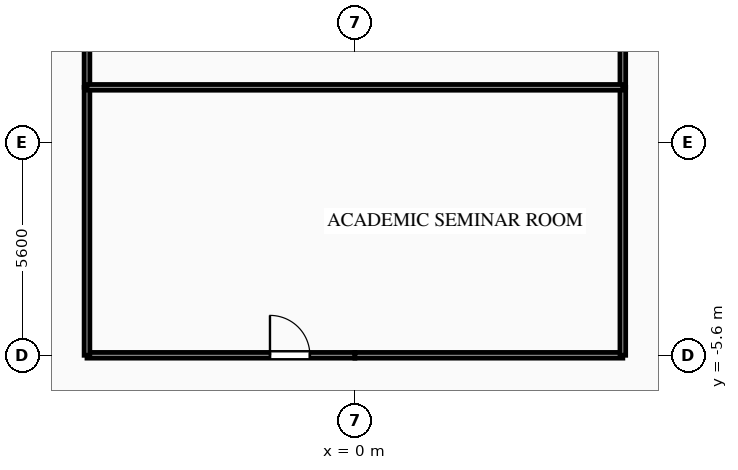
"""IFC4 building model, lengths in metres.
Left out: names, types, materials, properties, quantities, classifications, styles, units other than length and angle.
Written with IfcOpenShell. Run it as: python <this file> out.ifc"""

import sys

from ifc_helpers import new_model, si_unit, direction, frame, frame_2d, origin, place, context, subcontext, project, spatial, rectangle, extrude, element, fill, save


model = new_model("IFC4")
c1 = context("Model", 3, precision=1e-05, world=origin(), true_north=direction((0.0, 1.0)))
c2 = subcontext(c1, "Body", "Model", "MODEL_VIEW")
j1 = project(units=[si_unit("LENGTHUNIT", "METRE"), si_unit("PLANEANGLEUNIT", "RADIAN")], contexts=[c1])
p1 = place(None, origin())
s1 = spatial("IfcSite", under=j1, at=p1, CompositionType="ELEMENT")
p2 = place(p1, origin())
s2 = spatial("IfcBuilding", under=s1, at=p2, CompositionType="ELEMENT")
p3 = place(p2, frame((0.0, 0.0, 251.75)))
s3 = spatial("IfcBuildingStorey", under=s2, at=p3, CompositionType="ELEMENT", Elevation=251.75)
p4 = place(p3, frame((-7.05, -5.6, 0.0), z_axis=(0.0, 0.0, 1.0), x_axis=(1.0, 0.0, 0.0)))
e1 = element("IfcWall", 1, at=p4, inside=s3, PredefinedType="PARTITIONING", context=c2, shape_type="SweptSolid", body=[
    extrude(rectangle(XDim=7.05, YDim=0.15, at=frame_2d((3.525, 0.0))), origin(), (0.0, 0.0, 1.0), 2.525),
])
p5 = place(p4, frame((4.815, 0.0, 0.0)))
e2 = element("IfcOpeningElement", 2, at=p5, cuts=e1, PredefinedType="OPENING", context=c2, shape_type="SweptSolid", body=[
    extrude(rectangle(XDim=1.05, YDim=2.15, at=frame_2d((0.525, 1.075))), frame((0.0, 0.085, 0.0), z_axis=(0.0, -1.0, 0.0), x_axis=(1.0, 0.0, 0.0)), (0.0, 0.0, 1.0), 0.17),
])
p6 = place(p3, frame((0.0, -5.6, 0.0), z_axis=(0.0, 0.0, 1.0), x_axis=(1.0, 0.0, 0.0)))
e3 = element("IfcWall", 3, at=p6, inside=s3, PredefinedType="PARTITIONING", context=c2, shape_type="SweptSolid", body=[
    extrude(rectangle(XDim=7.05, YDim=0.15, at=frame_2d((3.525, 0.0))), origin(), (0.0, 0.0, 1.0), 2.525),
])
for number, where, z_axis, x_axis in (
    (4, (-7.05, 1.45, 0.0), (0.0, 0.0, 1.0), (0.0, -1.0, 0.0)),
    (5, (-7.05, 8.5, 0.0), (0.0, 0.0, 1.0), (0.0, -1.0, 0.0)),
    (6, (7.05, -5.6, 0.0), (0.0, 0.0, 1.0), (0.0, 1.0, 0.0)),
    (7, (7.05, 1.45, 0.0), (0.0, 0.0, 1.0), (0.0, 1.0, 0.0)),
):
    element("IfcWall", number, at=place(p3, frame(where, z_axis=z_axis, x_axis=x_axis)), inside=s3, PredefinedType="PARTITIONING", context=c2, shape_type="SweptSolid", body=[
        extrude(rectangle(XDim=7.05, YDim=0.15, at=frame_2d((3.525, 0.0))), origin(), (0.0, 0.0, 1.0), 3.04),
    ])
p7 = place(p3, frame((-7.05, 1.45, 0.0), z_axis=(0.0, 0.0, 1.0), x_axis=(1.0, 0.0, 0.0)))
e8 = element("IfcWall", 8, at=p7, inside=s3, PredefinedType="PARTITIONING", context=c2, shape_type="SweptSolid", body=[
    extrude(rectangle(XDim=14.1, YDim=0.15, at=frame_2d((7.05, 0.0))), origin(), (0.0, 0.0, 1.0), 3.04),
])
p8 = place(p5, origin())
e9 = element("IfcDoor", 9, at=p8, inside=s3, OperationType="SINGLE_SWING_LEFT", PredefinedType="DOOR", context=c2, shape_type="SweptSolid", body=[
    extrude(rectangle(XDim=1.05, YDim=2.15, at=frame_2d((0.525, 1.075))), frame((0.0, 0.025, 0.0), z_axis=(0.0, -1.0, 0.0), x_axis=(1.0, 0.0, 0.0)), (0.0, 0.0, 1.0), 0.05),
])
fill(e2, e9)
save(model, sys.argv[1])
